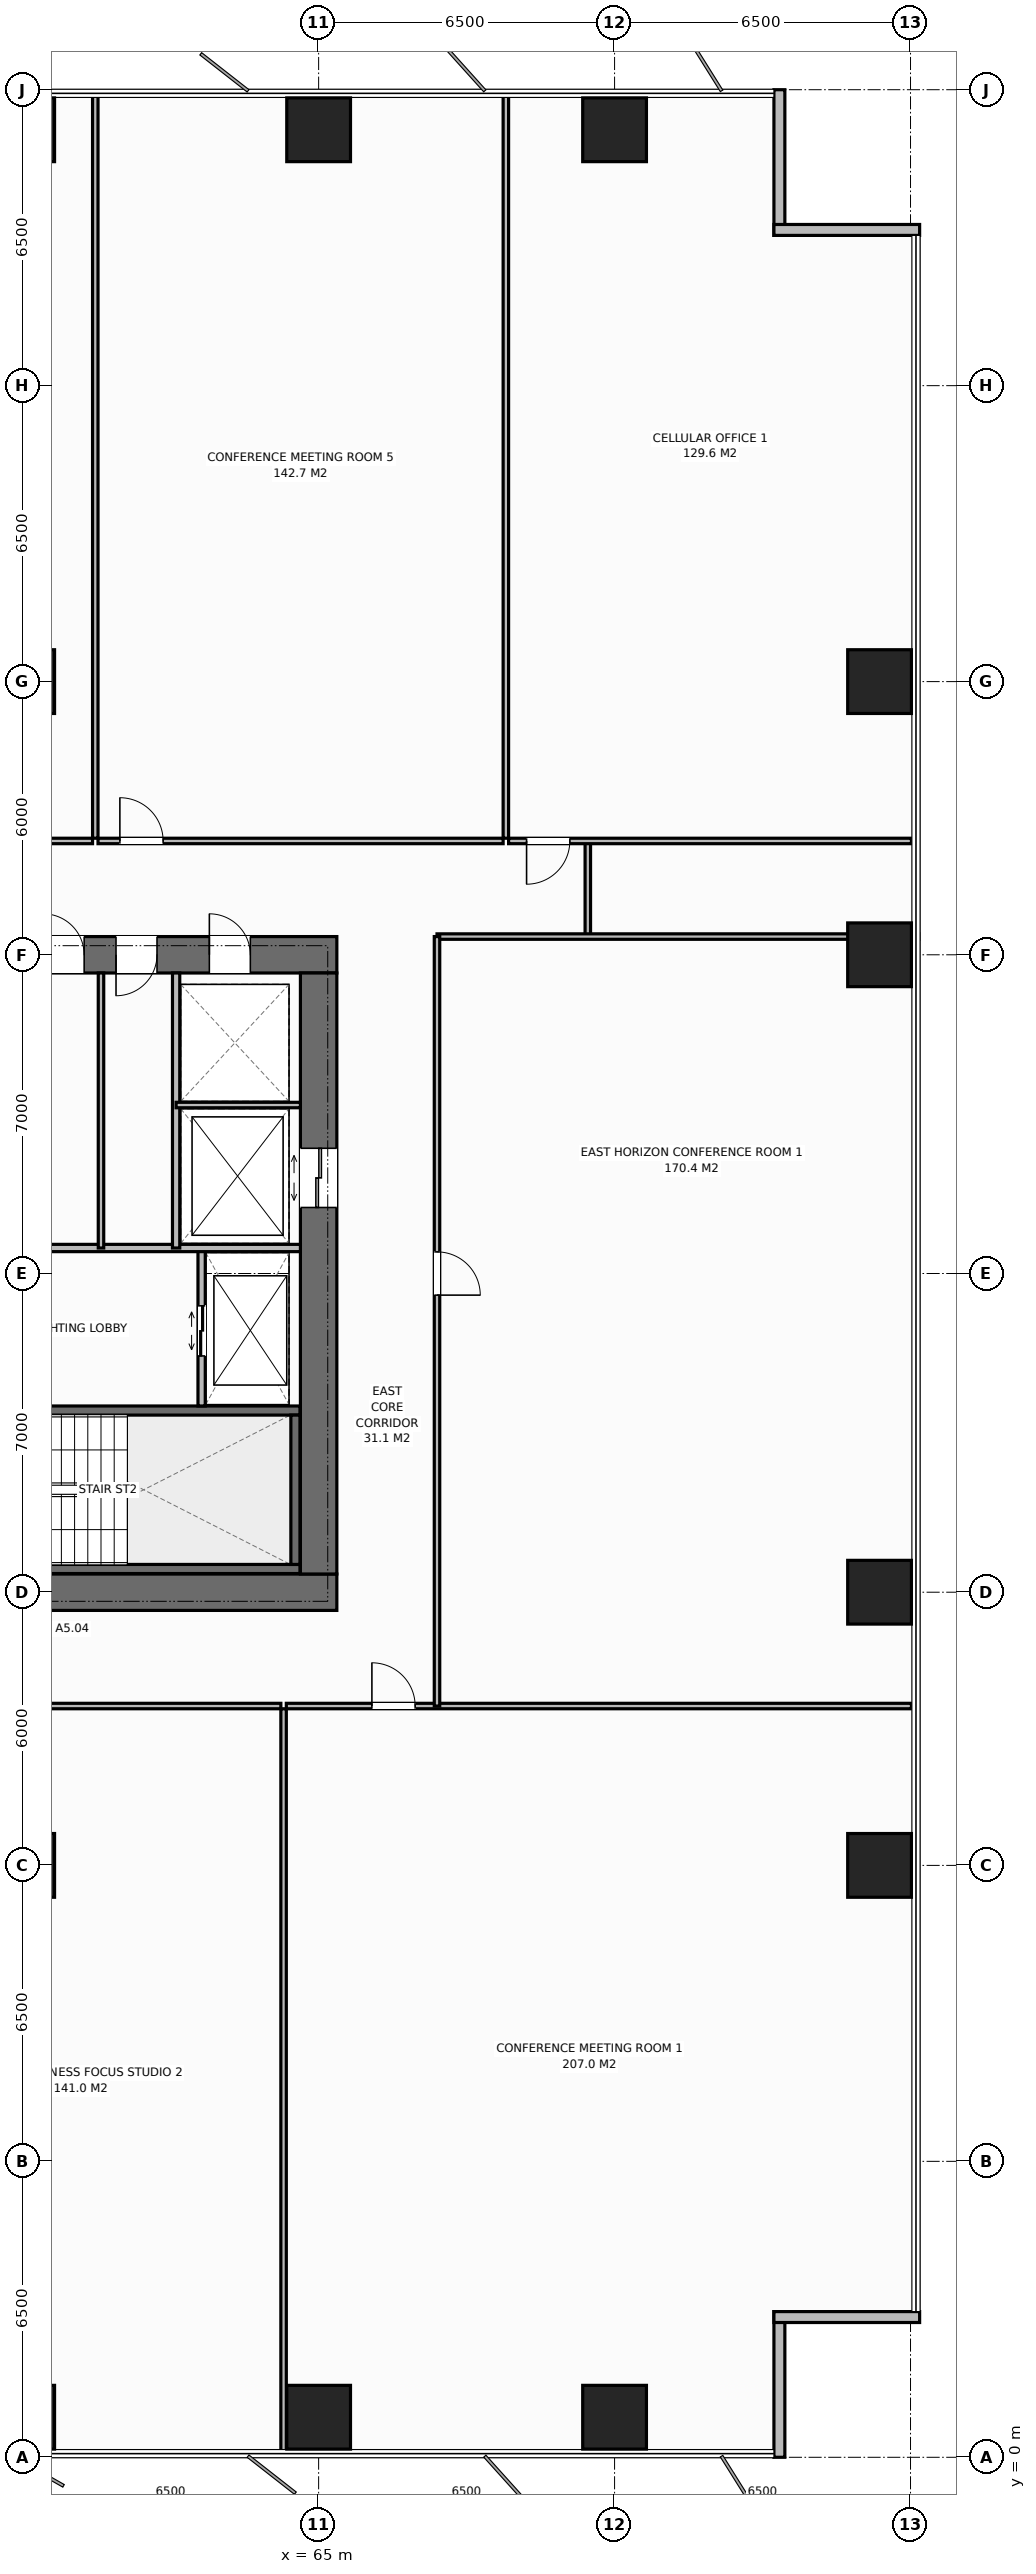
"""IFC4 building model, lengths in metres.
Left out: names, types, materials, properties, quantities, classifications, styles, units other than length and angle.
Written with IfcOpenShell. Run it as: python <this file> out.ifc"""

import sys

from ifc_helpers import new_model, si_unit, direction, frame, frame_2d, origin, origin_2d, place, context, subcontext, project, spatial, rectangle, extrude, element, fill, save


model = new_model("IFC4")
c1 = context("Model", 3, precision=1e-05, world=origin(), true_north=direction((0.0, 1.0)))
c2 = subcontext(c1, "Body", "Model", "MODEL_VIEW")
j1 = project(units=[si_unit("LENGTHUNIT", "METRE"), si_unit("PLANEANGLEUNIT", "RADIAN")], contexts=[c1])
p1 = place(None, origin())
s1 = spatial("IfcSite", under=j1, at=p1, CompositionType="ELEMENT")
p2 = place(p1, origin())
s2 = spatial("IfcBuilding", under=s1, at=p2, CompositionType="ELEMENT")
p3 = place(p2, frame((0.0, 0.0, 77.2)))
s3 = spatial("IfcBuildingStorey", under=s2, at=p3, CompositionType="ELEMENT", Elevation=77.2)
p4 = place(p3, frame((51.6, 19.0, 0.0), z_axis=(0.0, 0.0, 1.0), x_axis=(1.0, 0.0, 0.0)))
e1 = element("IfcWall", 1, at=p4, inside=s3, PredefinedType="SHEAR", context=c2, shape_type="SweptSolid", body=[
    extrude(rectangle(XDim=13.8, YDim=0.8, at=frame_2d((6.9, 0.0))), origin(), (0.0, 0.0, 1.0), 3.8),
])
p5 = place(p4, frame((3.12, 0.0, 0.0)))
e2 = element("IfcOpeningElement", 2, at=p5, cuts=e1, PredefinedType="OPENING", context=c2, shape_type="SweptSolid", body=[
    extrude(rectangle(XDim=1.4, YDim=2.2, at=frame_2d((0.7, 1.1))), frame((0.0, 0.41, 0.0), z_axis=(0.0, -1.0, 0.0), x_axis=(1.0, 0.0, 0.0)), (0.0, 0.0, 1.0), 0.82),
])
p6 = place(p3, frame((51.6, 33.0, 0.0), z_axis=(0.0, 0.0, 1.0), x_axis=(1.0, 0.0, 0.0)))
e3 = element("IfcWall", 3, at=p6, inside=s3, PredefinedType="SHEAR", context=c2, shape_type="SweptSolid", body=[
    extrude(rectangle(XDim=13.8, YDim=0.8, at=frame_2d((6.9, 0.0))), origin(), (0.0, 0.0, 1.0), 3.8),
])
p7 = place(p6, frame((3.12, 0.0, 0.0)))
e4 = element("IfcOpeningElement", 4, at=p7, cuts=e3, PredefinedType="OPENING", context=c2, shape_type="SweptSolid", body=[
    extrude(rectangle(XDim=1.4, YDim=2.2, at=frame_2d((0.7, 1.1))), frame((0.0, 0.41, 0.0), z_axis=(0.0, -1.0, 0.0), x_axis=(1.0, 0.0, 0.0)), (0.0, 0.0, 1.0), 0.82),
])
p8 = place(p6, frame((11.0, 0.0, 0.0)))
e5 = element("IfcOpeningElement", 5, at=p8, cuts=e3, PredefinedType="OPENING", context=c2, shape_type="SweptSolid", body=[
    extrude(rectangle(XDim=0.9, YDim=2.15, at=frame_2d((0.45, 1.075))), frame((0.0, 0.41, 0.0), z_axis=(0.0, -1.0, 0.0), x_axis=(1.0, 0.0, 0.0)), (0.0, 0.0, 1.0), 0.82),
])
p9 = place(p6, frame((5.75, 0.0, 0.0)))
e6 = element("IfcOpeningElement", 6, at=p9, cuts=e3, PredefinedType="OPENING", context=c2, shape_type="SweptSolid", body=[
    extrude(rectangle(XDim=0.9, YDim=2.15, at=frame_2d((0.45, 1.075))), frame((0.0, 0.41, 0.0), z_axis=(0.0, -1.0, 0.0), x_axis=(1.0, 0.0, 0.0)), (0.0, 0.0, 1.0), 0.82),
])
p10 = place(p6, frame((7.35, 0.0, 0.0)))
e7 = element("IfcOpeningElement", 7, at=p10, cuts=e3, PredefinedType="OPENING", context=c2, shape_type="SweptSolid", body=[
    extrude(rectangle(XDim=0.9, YDim=2.15, at=frame_2d((0.45, 1.075))), frame((0.0, 0.41, 0.0), z_axis=(0.0, -1.0, 0.0), x_axis=(1.0, 0.0, 0.0)), (0.0, 0.0, 1.0), 0.82),
])
p11 = place(p6, frame((8.95, 0.0, 0.0)))
e8 = element("IfcOpeningElement", 8, at=p11, cuts=e3, PredefinedType="OPENING", context=c2, shape_type="SweptSolid", body=[
    extrude(rectangle(XDim=0.9, YDim=2.15, at=frame_2d((0.45, 1.075))), frame((0.0, 0.41, 0.0), z_axis=(0.0, -1.0, 0.0), x_axis=(1.0, 0.0, 0.0)), (0.0, 0.0, 1.0), 0.82),
])
p12 = place(p3, frame((65.0, 19.4, 0.0), z_axis=(0.0, 0.0, 1.0), x_axis=(0.0, 1.0, 0.0)))
e9 = element("IfcWall", 9, at=p12, inside=s3, PredefinedType="SHEAR", context=c2, shape_type="SweptSolid", body=[
    extrude(rectangle(XDim=13.2, YDim=0.8, at=frame_2d((6.6, 0.0))), origin(), (0.0, 0.0, 1.0), 3.8),
])
p13 = place(p12, frame((8.05, 0.0, 0.0)))
e10 = element("IfcOpeningElement", 10, at=p13, cuts=e9, PredefinedType="OPENING", context=c2, shape_type="SweptSolid", body=[
    extrude(rectangle(XDim=1.3, YDim=2.2, at=frame_2d((0.65, 1.1))), frame((0.0, 0.41, 0.0), z_axis=(0.0, -1.0, 0.0), x_axis=(1.0, 0.0, 0.0)), (0.0, 0.0, 1.0), 0.82),
])
p14 = place(p3, frame((56.16, 19.51, 0.0), z_axis=(0.0, 0.0, 1.0), x_axis=(1.0, 0.0, 0.0)))
e11 = element("IfcWall", 11, at=p14, inside=s3, PredefinedType="SHEAR", context=c2, shape_type="SweptSolid", body=[
    extrude(rectangle(XDim=8.43, YDim=0.2, at=frame_2d((4.215, 0.0))), origin(), (0.0, 0.0, 1.0), 3.8),
])
p15 = place(p3, frame((56.16, 22.99, 0.0), z_axis=(0.0, 0.0, 1.0), x_axis=(1.0, 0.0, 0.0)))
e12 = element("IfcWall", 12, at=p15, inside=s3, PredefinedType="SHEAR", context=c2, shape_type="SweptSolid", body=[
    extrude(rectangle(XDim=8.43, YDim=0.2, at=frame_2d((4.215, 0.0))), origin(), (0.0, 0.0, 1.0), 3.8),
])
p16 = place(p15, frame((0.45, 0.0, 0.0)))
e13 = element("IfcOpeningElement", 13, at=p16, cuts=e12, PredefinedType="OPENING", context=c2, shape_type="SweptSolid", body=[
    extrude(rectangle(XDim=1.0, YDim=2.15, at=frame_2d((0.5, 1.075))), frame((0.0, 0.11, 0.0), z_axis=(0.0, -1.0, 0.0), x_axis=(1.0, 0.0, 0.0)), (0.0, 0.0, 1.0), 0.22),
])
p17 = place(p3, frame((64.49, 19.61, 0.0), z_axis=(0.0, 0.0, 1.0), x_axis=(0.0, 1.0, 0.0)))
e14 = element("IfcWall", 14, at=p17, inside=s3, PredefinedType="SHEAR", context=c2, shape_type="SweptSolid", body=[
    extrude(rectangle(XDim=3.28, YDim=0.2, at=frame_2d((1.64, 0.0))), origin(), (0.0, 0.0, 1.0), 3.8),
])
for number, where, z_axis, x_axis in (
    (15, (58.5, 13.0, 0.0), (0.0, 0.0, 1.0), (1.0, 0.0, 0.0)),
    (16, (58.5, 39.0, 0.0), (0.0, 0.0, 1.0), (1.0, 0.0, 0.0)),
    (17, (58.5, 0.88, 0.0), (0.0, 0.0, 1.0), (1.0, 0.0, 0.0)),
    (18, (58.5, 51.12, 0.0), (0.0, 0.0, 1.0), (1.0, 0.0, 0.0)),
    (19, (65.0, 0.88, 0.0), (0.0, 0.0, 1.0), (1.0, 0.0, 0.0)),
    (20, (65.0, 51.12, 0.0), (0.0, 0.0, 1.0), (1.0, 0.0, 0.0)),
    (21, (71.5, 0.88, 0.0), (0.0, 0.0, 1.0), (1.0, 0.0, 0.0)),
    (22, (71.5, 51.12, 0.0), (0.0, 0.0, 1.0), (1.0, 0.0, 0.0)),
    (23, (77.32, 13.0, 0.0), (0.0, 0.0, 1.0), (1.0, 0.0, 0.0)),
    (24, (77.32, 19.0, 0.0), (0.0, 0.0, 1.0), (1.0, 0.0, 0.0)),
    (25, (77.32, 33.0, 0.0), (0.0, 0.0, 1.0), (1.0, 0.0, 0.0)),
    (26, (77.32, 39.0, 0.0), (0.0, 0.0, 1.0), (1.0, 0.0, 0.0)),
):
    element("IfcColumn", number, at=place(p3, frame(where, z_axis=z_axis, x_axis=x_axis)), inside=s3, PredefinedType="COLUMN", context=c2, shape_type="SweptSolid", body=[
        extrude(rectangle(XDim=1.4, YDim=1.4, at=origin_2d()), origin(), (0.0, 0.0, 1.0), 3.8),
    ])
for number, where, z_axis, x_axis in (
    (27, (75.12, 52.0, 0.0), (0.0, 0.0, 1.0), (0.0, -1.0, 0.0)),
    (28, (75.0, 48.92, 0.0), (0.0, 0.0, 1.0), (1.0, 0.0, 0.0)),
    (29, (75.12, 3.2, 0.0), (0.0, 0.0, 1.0), (0.0, -1.0, 0.0)),
    (30, (78.2, 3.08, 0.0), (0.0, 0.0, 1.0), (-1.0, 0.0, 0.0)),
):
    element("IfcWall", number, at=place(p3, frame(where, z_axis=z_axis, x_axis=x_axis)), inside=s3, PredefinedType="STANDARD", context=c2, shape_type="SweptSolid", body=[
        extrude(rectangle(XDim=3.2, YDim=0.24, at=frame_2d((1.6, 0.0))), origin(), (0.0, 0.0, 1.0), 3.52),
    ])
p18 = place(p3, frame((62.43, 23.09, 0.0), z_axis=(0.0, 0.0, 1.0), x_axis=(0.0, 1.0, 0.0)))
e31 = element("IfcWall", 31, at=p18, inside=s3, PredefinedType="STANDARD", context=c2, shape_type="SweptSolid", body=[
    extrude(rectangle(XDim=3.47, YDim=0.16, at=frame_2d((1.735, 0.0))), origin(), (0.0, 0.0, 1.0), 3.52),
])
p19 = place(p18, frame((1.1, 0.0, 0.0)))
e32 = element("IfcOpeningElement", 32, at=p19, cuts=e31, PredefinedType="OPENING", context=c2, shape_type="SweptSolid", body=[
    extrude(rectangle(XDim=1.1, YDim=2.2, at=frame_2d((0.55, 1.1))), frame((0.0, 0.09, 0.0), z_axis=(0.0, -1.0, 0.0), x_axis=(1.0, 0.0, 0.0)), (0.0, 0.0, 1.0), 0.18),
])
p20 = place(p3, frame((56.26, 26.56, 0.0), z_axis=(0.0, 0.0, 1.0), x_axis=(1.0, 0.0, 0.0)))
e33 = element("IfcWall", 33, at=p20, inside=s3, PredefinedType="STANDARD", context=c2, shape_type="SweptSolid", body=[
    extrude(rectangle(XDim=8.34, YDim=0.16, at=frame_2d((4.17, 0.0))), origin(), (0.0, 0.0, 1.0), 3.52),
])
p21 = place(p3, frame((61.87, 26.56, 0.0), z_axis=(0.0, 0.0, 1.0), x_axis=(0.0, 1.0, 0.0)))
e34 = element("IfcWall", 34, at=p21, inside=s3, PredefinedType="STANDARD", context=c2, shape_type="SweptSolid", body=[
    extrude(rectangle(XDim=6.04, YDim=0.16, at=frame_2d((3.02, 0.0))), origin(), (0.0, 0.0, 1.0), 3.52),
])
p22 = place(p3, frame((61.87, 29.7, 0.0), z_axis=(0.0, 0.0, 1.0), x_axis=(1.0, 0.0, 0.0)))
e35 = element("IfcWall", 35, at=p22, inside=s3, PredefinedType="PARTITIONING", context=c2, shape_type="SweptSolid", body=[
    extrude(rectangle(XDim=2.73, YDim=0.12, at=frame_2d((1.365, 0.0))), origin(), (0.0, 0.0, 1.0), 3.52),
])
p23 = place(p3, frame((60.22, 26.56, 0.0), z_axis=(0.0, 0.0, 1.0), x_axis=(0.0, 1.0, 0.0)))
e36 = element("IfcWall", 36, at=p23, inside=s3, PredefinedType="PARTITIONING", context=c2, shape_type="SweptSolid", body=[
    extrude(rectangle(XDim=6.04, YDim=0.12, at=frame_2d((3.02, 0.0))), origin(), (0.0, 0.0, 1.0), 3.52),
])
p24 = place(p3, frame((70.912, 33.4, 0.0), z_axis=(0.0, 0.0, 1.0), x_axis=(0.0, 1.0, 0.0)))
e37 = element("IfcWall", 37, at=p24, inside=s3, PredefinedType="PARTITIONING", context=c2, shape_type="SweptSolid", body=[
    extrude(rectangle(XDim=2.1, YDim=0.12, at=frame_2d((1.05, 0.0))), origin(), (0.0, 0.0, 1.0), 3.52),
])
p25 = place(p3, frame((60.094, 35.56, 0.0), z_axis=(0.0, 0.0, 1.0), x_axis=(0.0, 1.0, 0.0)))
e38 = element("IfcWall", 38, at=p25, inside=s3, PredefinedType="PARTITIONING", context=c2, shape_type="SweptSolid", body=[
    extrude(rectangle(XDim=16.42, YDim=0.12, at=frame_2d((8.21, 0.0))), origin(), (0.0, 0.0, 1.0), 3.52),
])
p26 = place(p3, frame((54.216, 35.5, 0.0), z_axis=(0.0, 0.0, 1.0), x_axis=(1.0, 0.0, 0.0)))
e39 = element("IfcWall", 39, at=p26, inside=s3, PredefinedType="PARTITIONING", context=c2, shape_type="SweptSolid", body=[
    extrude(rectangle(XDim=5.819, YDim=0.12, at=frame_2d((2.909, 0.0))), origin(), (0.0, 0.0, 1.0), 3.52),
])
p27 = place(p26, frame((0.48, 0.0, 0.0)))
e40 = element("IfcOpeningElement", 40, at=p27, cuts=e39, PredefinedType="OPENING", context=c2, shape_type="SweptSolid", body=[
    extrude(rectangle(XDim=0.95, YDim=2.15, at=frame_2d((0.475, 1.075))), frame((0.0, 0.07, 0.0), z_axis=(0.0, -1.0, 0.0), x_axis=(1.0, 0.0, 0.0)), (0.0, 0.0, 1.0), 0.14),
])
p28 = place(p3, frame((69.112, 35.56, 0.0), z_axis=(0.0, 0.0, 1.0), x_axis=(0.0, 1.0, 0.0)))
e41 = element("IfcWall", 41, at=p28, inside=s3, PredefinedType="PARTITIONING", context=c2, shape_type="SweptSolid", body=[
    extrude(rectangle(XDim=16.42, YDim=0.12, at=frame_2d((8.21, 0.0))), origin(), (0.0, 0.0, 1.0), 3.52),
])
p29 = place(p3, frame((60.155, 35.5, 0.0), z_axis=(0.0, 0.0, 1.0), x_axis=(1.0, 0.0, 0.0)))
e42 = element("IfcWall", 42, at=p29, inside=s3, PredefinedType="PARTITIONING", context=c2, shape_type="SweptSolid", body=[
    extrude(rectangle(XDim=8.898, YDim=0.12, at=frame_2d((4.449, 0.0))), origin(), (0.0, 0.0, 1.0), 3.52),
])
p30 = place(p29, frame((0.48, 0.0, 0.0)))
e43 = element("IfcOpeningElement", 43, at=p30, cuts=e42, PredefinedType="OPENING", context=c2, shape_type="SweptSolid", body=[
    extrude(rectangle(XDim=0.95, YDim=2.15, at=frame_2d((0.475, 1.075))), frame((0.0, 0.07, 0.0), z_axis=(0.0, -1.0, 0.0), x_axis=(1.0, 0.0, 0.0)), (0.0, 0.0, 1.0), 0.14),
])
p31 = place(p3, frame((69.172, 35.5, 0.0), z_axis=(0.0, 0.0, 1.0), x_axis=(1.0, 0.0, 0.0)))
e44 = element("IfcWall", 44, at=p31, inside=s3, PredefinedType="PARTITIONING", context=c2, shape_type="SweptSolid", body=[
    extrude(rectangle(XDim=8.848, YDim=0.12, at=frame_2d((4.424, 0.0))), origin(), (0.0, 0.0, 1.0), 3.52),
])
p32 = place(p31, frame((0.395, 0.0, 0.0)))
e45 = element("IfcOpeningElement", 45, at=p32, cuts=e44, PredefinedType="OPENING", context=c2, shape_type="SweptSolid", body=[
    extrude(rectangle(XDim=0.95, YDim=2.15, at=frame_2d((0.475, 1.075))), frame((0.0, 0.07, 0.0), z_axis=(0.0, -1.0, 0.0), x_axis=(1.0, 0.0, 0.0)), (0.0, 0.0, 1.0), 0.14),
])
p33 = place(p3, frame((64.23, 0.02, 0.0), z_axis=(0.0, 0.0, 1.0), x_axis=(0.0, 1.0, 0.0)))
e46 = element("IfcWall", 46, at=p33, inside=s3, PredefinedType="PARTITIONING", context=c2, shape_type="SweptSolid", body=[
    extrude(rectangle(XDim=16.42, YDim=0.12, at=frame_2d((8.21, 0.0))), origin(), (0.0, 0.0, 1.0), 3.52),
])
p34 = place(p3, frame((55.378, 16.5, 0.0), z_axis=(0.0, 0.0, 1.0), x_axis=(1.0, 0.0, 0.0)))
e47 = element("IfcWall", 47, at=p34, inside=s3, PredefinedType="PARTITIONING", context=c2, shape_type="SweptSolid", body=[
    extrude(rectangle(XDim=8.792, YDim=0.12, at=frame_2d((4.396, 0.0))), origin(), (0.0, 0.0, 1.0), 3.52),
])
p35 = place(p34, frame((0.48, 0.0, 0.0)))
e48 = element("IfcOpeningElement", 48, at=p35, cuts=e47, PredefinedType="OPENING", context=c2, shape_type="SweptSolid", body=[
    extrude(rectangle(XDim=0.95, YDim=2.15, at=frame_2d((0.475, 1.075))), frame((0.0, 0.07, 0.0), z_axis=(0.0, -1.0, 0.0), x_axis=(1.0, 0.0, 0.0)), (0.0, 0.0, 1.0), 0.14),
])
p36 = place(p3, frame((64.29, 16.5, 0.0), z_axis=(0.0, 0.0, 1.0), x_axis=(1.0, 0.0, 0.0)))
e49 = element("IfcWall", 49, at=p36, inside=s3, PredefinedType="PARTITIONING", context=c2, shape_type="SweptSolid", body=[
    extrude(rectangle(XDim=13.73, YDim=0.12, at=frame_2d((6.865, 0.0))), origin(), (0.0, 0.0, 1.0), 3.52),
])
p37 = place(p36, frame((1.88, 0.0, 0.0)))
e50 = element("IfcOpeningElement", 50, at=p37, cuts=e49, PredefinedType="OPENING", context=c2, shape_type="SweptSolid", body=[
    extrude(rectangle(XDim=0.95, YDim=2.15, at=frame_2d((0.475, 1.075))), frame((0.0, 0.07, 0.0), z_axis=(0.0, -1.0, 0.0), x_axis=(1.0, 0.0, 0.0)), (0.0, 0.0, 1.0), 0.14),
])
p38 = place(p3, frame((67.6, 33.4, 0.0), z_axis=(0.0, 0.0, 1.0), x_axis=(1.0, 0.0, 0.0)))
e51 = element("IfcWall", 51, at=p38, inside=s3, PredefinedType="PARTITIONING", context=c2, shape_type="SweptSolid", body=[
    extrude(rectangle(XDim=10.58, YDim=0.12, at=frame_2d((5.29, 0.0))), origin(), (0.0, 0.0, 1.0), 3.52),
])
p39 = place(p3, frame((67.6, 16.5, 0.0), z_axis=(0.0, 0.0, 1.0), x_axis=(0.0, 1.0, 0.0)))
e52 = element("IfcWall", 52, at=p39, inside=s3, PredefinedType="PARTITIONING", context=c2, shape_type="SweptSolid", body=[
    extrude(rectangle(XDim=16.9, YDim=0.12, at=frame_2d((8.45, 0.0))), origin(), (0.0, 0.0, 1.0), 3.52),
])
p40 = place(p39, frame((9.025, 0.0, 0.0)))
e53 = element("IfcOpeningElement", 53, at=p40, cuts=e52, PredefinedType="OPENING", context=c2, shape_type="SweptSolid", body=[
    extrude(rectangle(XDim=0.95, YDim=2.15, at=frame_2d((0.475, 1.075))), frame((0.0, 0.07, 0.0), z_axis=(0.0, -1.0, 0.0), x_axis=(1.0, 0.0, 0.0)), (0.0, 0.0, 1.0), 0.14),
])
p41 = place(p19, origin())
e54 = element("IfcDoor", 54, at=p41, inside=s3, OperationType="DOUBLE_DOOR_SLIDING", PredefinedType="DOOR", context=c2, shape_type="SweptSolid", body=[
    extrude(rectangle(XDim=1.1, YDim=2.2, at=frame_2d((0.55, 1.1))), frame((0.0, 0.025, 0.0), z_axis=(0.0, -1.0, 0.0), x_axis=(1.0, 0.0, 0.0)), (0.0, 0.0, 1.0), 0.05),
])
fill(e32, e54)
p42 = place(p13, origin())
e55 = element("IfcDoor", 55, at=p42, inside=s3, OperationType="DOUBLE_DOOR_SLIDING", PredefinedType="DOOR", context=c2, shape_type="SweptSolid", body=[
    extrude(rectangle(XDim=1.3, YDim=2.2, at=frame_2d((0.65, 1.1))), frame((0.0, 0.025, 0.0), z_axis=(0.0, -1.0, 0.0), x_axis=(1.0, 0.0, 0.0)), (0.0, 0.0, 1.0), 0.05),
])
fill(e10, e55)
p43 = place(p8, origin())
e56 = element("IfcDoor", 56, at=p43, inside=s3, OperationType="SINGLE_SWING_LEFT", PredefinedType="DOOR", context=c2, shape_type="SweptSolid", body=[
    extrude(rectangle(XDim=0.9, YDim=2.15, at=frame_2d((0.45, 1.075))), frame((0.0, -0.075, 0.0), z_axis=(0.0, -1.0, 0.0), x_axis=(1.0, 0.0, 0.0)), (0.0, 0.0, 1.0), 0.05),
])
fill(e5, e56)
p44 = place(p10, origin())
e57 = element("IfcDoor", 57, at=p44, inside=s3, OperationType="SINGLE_SWING_LEFT", PredefinedType="DOOR", context=c2, shape_type="SweptSolid", body=[
    extrude(rectangle(XDim=0.9, YDim=2.15, at=frame_2d((0.45, 1.075))), frame((0.0, -0.075, 0.0), z_axis=(0.0, -1.0, 0.0), x_axis=(1.0, 0.0, 0.0)), (0.0, 0.0, 1.0), 0.05),
])
fill(e7, e57)
p45 = place(p11, origin())
e58 = element("IfcDoor", 58, at=p45, inside=s3, OperationType="SINGLE_SWING_RIGHT", PredefinedType="DOOR", context=c2, shape_type="SweptSolid", body=[
    extrude(rectangle(XDim=0.9, YDim=2.15, at=frame_2d((0.45, 1.075))), frame((0.0, -0.075, 0.0), z_axis=(0.0, -1.0, 0.0), x_axis=(1.0, 0.0, 0.0)), (0.0, 0.0, 1.0), 0.05),
])
fill(e8, e58)
p46 = place(p30, origin())
e59 = element("IfcDoor", 59, at=p46, inside=s3, OperationType="SINGLE_SWING_LEFT", PredefinedType="DOOR", context=c2, shape_type="SweptSolid", body=[
    extrude(rectangle(XDim=0.95, YDim=2.15, at=frame_2d((0.475, 1.075))), frame((0.0, 0.025, 0.0), z_axis=(0.0, -1.0, 0.0), x_axis=(1.0, 0.0, 0.0)), (0.0, 0.0, 1.0), 0.05),
])
fill(e43, e59)
p47 = place(p32, origin())
e60 = element("IfcDoor", 60, at=p47, inside=s3, OperationType="SINGLE_SWING_RIGHT", PredefinedType="DOOR", context=c2, shape_type="SweptSolid", body=[
    extrude(rectangle(XDim=0.95, YDim=2.15, at=frame_2d((0.475, 1.075))), frame((0.0, 0.025, 0.0), z_axis=(0.0, -1.0, 0.0), x_axis=(1.0, 0.0, 0.0)), (0.0, 0.0, 1.0), 0.05),
])
fill(e45, e60)
p48 = place(p37, origin())
e61 = element("IfcDoor", 61, at=p48, inside=s3, OperationType="SINGLE_SWING_LEFT", PredefinedType="DOOR", context=c2, shape_type="SweptSolid", body=[
    extrude(rectangle(XDim=0.95, YDim=2.15, at=frame_2d((0.475, 1.075))), frame((0.0, 0.025, 0.0), z_axis=(0.0, -1.0, 0.0), x_axis=(1.0, 0.0, 0.0)), (0.0, 0.0, 1.0), 0.05),
])
fill(e50, e61)
p49 = place(p40, origin())
e62 = element("IfcDoor", 62, at=p49, inside=s3, OperationType="SINGLE_SWING_RIGHT", PredefinedType="DOOR", context=c2, shape_type="SweptSolid", body=[
    extrude(rectangle(XDim=0.95, YDim=2.15, at=frame_2d((0.475, 1.075))), frame((0.0, 0.025, 0.0), z_axis=(0.0, -1.0, 0.0), x_axis=(1.0, 0.0, 0.0)), (0.0, 0.0, 1.0), 0.05),
])
fill(e53, e62)
save(model, sys.argv[1])
